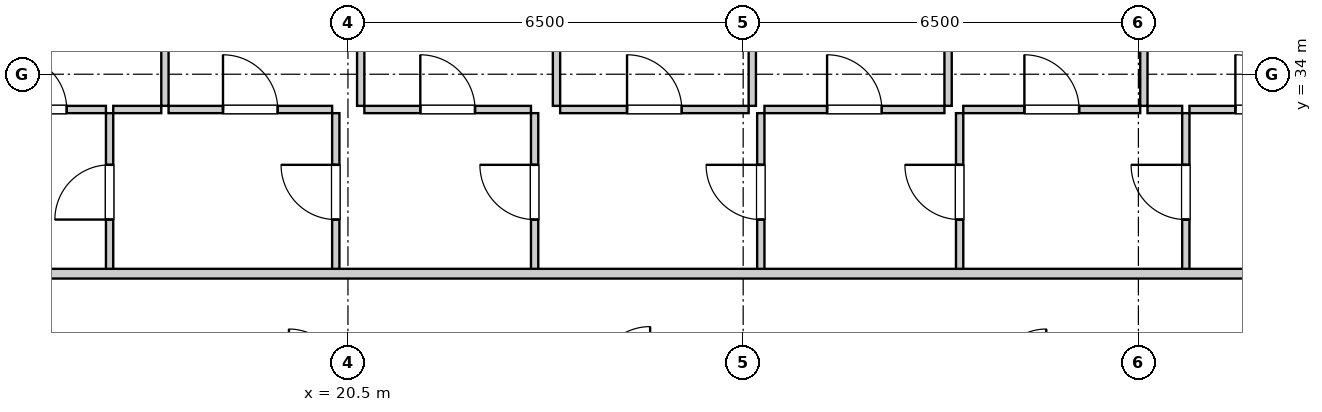
"""IFC4 building model, lengths in metres.
Left out: names, types, materials, properties, quantities, classifications, styles, units other than length and angle.
Written with IfcOpenShell. Run it as: python <this file> out.ifc"""

import sys

from ifc_helpers import new_model, si_unit, direction, frame, frame_2d, origin, place, context, subcontext, project, spatial, rectangle, extrude, element, fill, save


model = new_model("IFC4")
c1 = context("Model", 3, precision=1e-05, world=origin(), true_north=direction((0.0, 1.0)))
c2 = subcontext(c1, "Body", "Model", "MODEL_VIEW")
j1 = project(units=[si_unit("LENGTHUNIT", "METRE"), si_unit("PLANEANGLEUNIT", "RADIAN")], contexts=[c1])
p1 = place(None, origin())
s1 = spatial("IfcSite", under=j1, at=p1, CompositionType="ELEMENT")
p2 = place(p1, origin())
s2 = spatial("IfcBuilding", under=s1, at=p2, CompositionType="ELEMENT")
p3 = place(p2, frame((0.0, 0.0, 45.0)))
s3 = spatial("IfcBuildingStorey", under=s2, at=p3, CompositionType="ELEMENT", Elevation=45.0)
p4 = place(p3, frame((16.58, 30.76, 0.0), z_axis=(0.0, 0.0, 1.0), x_axis=(0.0, 1.0, 0.0)))
e1 = element("IfcWall", 1, at=p4, inside=s3, PredefinedType="PARTITIONING", context=c2, shape_type="SweptSolid", body=[
    extrude(rectangle(XDim=2.6, YDim=0.12, at=frame_2d((1.3, 0.0))), origin(), (0.0, 0.0, 1.0), 2.94),
])
p5 = place(p4, frame((0.85, 0.0, 0.0)))
e2 = element("IfcOpeningElement", 2, at=p5, cuts=e1, PredefinedType="OPENING", context=c2, shape_type="SweptSolid", body=[
    extrude(rectangle(XDim=0.9, YDim=2.05, at=frame_2d((0.45, 1.025))), frame((0.0, 0.07, 0.0), z_axis=(0.0, -1.0, 0.0), x_axis=(1.0, 0.0, 0.0)), (0.0, 0.0, 1.0), 0.14),
])
p6 = place(p3, frame((14.33, 33.42, 0.0), z_axis=(0.0, 0.0, 1.0), x_axis=(1.0, 0.0, 0.0)))
e3 = element("IfcWall", 3, at=p6, inside=s3, PredefinedType="PARTITIONING", context=c2, shape_type="SweptSolid", body=[
    extrude(rectangle(XDim=2.19, YDim=0.12, at=frame_2d((1.095, 0.0))), origin(), (0.0, 0.0, 1.0), 2.94),
])
p7 = place(p6, frame((0.645, 0.0, 0.0)))
e4 = element("IfcOpeningElement", 4, at=p7, cuts=e3, PredefinedType="OPENING", context=c2, shape_type="SweptSolid", body=[
    extrude(rectangle(XDim=0.9, YDim=2.05, at=frame_2d((0.45, 1.025))), frame((0.0, 0.07, 0.0), z_axis=(0.0, -1.0, 0.0), x_axis=(1.0, 0.0, 0.0)), (0.0, 0.0, 1.0), 0.14),
])
p8 = place(p3, frame((20.3, 30.76, 0.0), z_axis=(0.0, 0.0, 1.0), x_axis=(0.0, 1.0, 0.0)))
e5 = element("IfcWall", 5, at=p8, inside=s3, PredefinedType="PARTITIONING", context=c2, shape_type="SweptSolid", body=[
    extrude(rectangle(XDim=2.6, YDim=0.12, at=frame_2d((1.3, 0.0))), origin(), (0.0, 0.0, 1.0), 2.94),
])
p9 = place(p8, frame((0.85, 0.0, 0.0)))
e6 = element("IfcOpeningElement", 6, at=p9, cuts=e5, PredefinedType="OPENING", context=c2, shape_type="SweptSolid", body=[
    extrude(rectangle(XDim=0.9, YDim=2.05, at=frame_2d((0.45, 1.025))), frame((0.0, 0.07, 0.0), z_axis=(0.0, -1.0, 0.0), x_axis=(1.0, 0.0, 0.0)), (0.0, 0.0, 1.0), 0.14),
])
p10 = place(p3, frame((16.64, 33.42, 0.0), z_axis=(0.0, 0.0, 1.0), x_axis=(1.0, 0.0, 0.0)))
e7 = element("IfcWall", 7, at=p10, inside=s3, PredefinedType="PARTITIONING", context=c2, shape_type="SweptSolid", body=[
    extrude(rectangle(XDim=0.79, YDim=0.12, at=frame_2d((0.395, 0.0))), origin(), (0.0, 0.0, 1.0), 2.94),
])
p11 = place(p3, frame((17.55, 33.42, 0.0), z_axis=(0.0, 0.0, 1.0), x_axis=(1.0, 0.0, 0.0)))
e8 = element("IfcWall", 8, at=p11, inside=s3, PredefinedType="PARTITIONING", context=c2, shape_type="SweptSolid", body=[
    extrude(rectangle(XDim=2.69, YDim=0.12, at=frame_2d((1.345, 0.0))), origin(), (0.0, 0.0, 1.0), 2.94),
])
p12 = place(p11, frame((0.895, 0.0, 0.0)))
e9 = element("IfcOpeningElement", 9, at=p12, cuts=e8, PredefinedType="OPENING", context=c2, shape_type="SweptSolid", body=[
    extrude(rectangle(XDim=0.9, YDim=2.05, at=frame_2d((0.45, 1.025))), frame((0.0, 0.07, 0.0), z_axis=(0.0, -1.0, 0.0), x_axis=(1.0, 0.0, 0.0)), (0.0, 0.0, 1.0), 0.14),
])
p13 = place(p3, frame((23.57, 30.76, 0.0), z_axis=(0.0, 0.0, 1.0), x_axis=(0.0, 1.0, 0.0)))
e10 = element("IfcWall", 10, at=p13, inside=s3, PredefinedType="PARTITIONING", context=c2, shape_type="SweptSolid", body=[
    extrude(rectangle(XDim=2.6, YDim=0.12, at=frame_2d((1.3, 0.0))), origin(), (0.0, 0.0, 1.0), 2.94),
])
p14 = place(p13, frame((0.85, 0.0, 0.0)))
e11 = element("IfcOpeningElement", 11, at=p14, cuts=e10, PredefinedType="OPENING", context=c2, shape_type="SweptSolid", body=[
    extrude(rectangle(XDim=0.9, YDim=2.05, at=frame_2d((0.45, 1.025))), frame((0.0, 0.07, 0.0), z_axis=(0.0, -1.0, 0.0), x_axis=(1.0, 0.0, 0.0)), (0.0, 0.0, 1.0), 0.14),
])
p15 = place(p3, frame((20.77, 33.42, 0.0), z_axis=(0.0, 0.0, 1.0), x_axis=(1.0, 0.0, 0.0)))
e12 = element("IfcWall", 12, at=p15, inside=s3, PredefinedType="PARTITIONING", context=c2, shape_type="SweptSolid", body=[
    extrude(rectangle(XDim=2.74, YDim=0.12, at=frame_2d((1.37, 0.0))), origin(), (0.0, 0.0, 1.0), 2.94),
])
p16 = place(p15, frame((0.92, 0.0, 0.0)))
e13 = element("IfcOpeningElement", 13, at=p16, cuts=e12, PredefinedType="OPENING", context=c2, shape_type="SweptSolid", body=[
    extrude(rectangle(XDim=0.9, YDim=2.05, at=frame_2d((0.45, 1.025))), frame((0.0, 0.07, 0.0), z_axis=(0.0, -1.0, 0.0), x_axis=(1.0, 0.0, 0.0)), (0.0, 0.0, 1.0), 0.14),
])
p17 = place(p3, frame((27.29, 30.76, 0.0), z_axis=(0.0, 0.0, 1.0), x_axis=(0.0, 1.0, 0.0)))
e14 = element("IfcWall", 14, at=p17, inside=s3, PredefinedType="PARTITIONING", context=c2, shape_type="SweptSolid", body=[
    extrude(rectangle(XDim=2.6, YDim=0.12, at=frame_2d((1.3, 0.0))), origin(), (0.0, 0.0, 1.0), 2.94),
])
p18 = place(p17, frame((0.85, 0.0, 0.0)))
e15 = element("IfcOpeningElement", 15, at=p18, cuts=e14, PredefinedType="OPENING", context=c2, shape_type="SweptSolid", body=[
    extrude(rectangle(XDim=0.9, YDim=2.05, at=frame_2d((0.45, 1.025))), frame((0.0, 0.07, 0.0), z_axis=(0.0, -1.0, 0.0), x_axis=(1.0, 0.0, 0.0)), (0.0, 0.0, 1.0), 0.14),
])
p19 = place(p3, frame((23.99, 33.42, 0.0), z_axis=(0.0, 0.0, 1.0), x_axis=(1.0, 0.0, 0.0)))
e16 = element("IfcWall", 16, at=p19, inside=s3, PredefinedType="PARTITIONING", context=c2, shape_type="SweptSolid", body=[
    extrude(rectangle(XDim=3.1, YDim=0.12, at=frame_2d((1.55, 0.0))), origin(), (0.0, 0.0, 1.0), 2.94),
])
p20 = place(p19, frame((1.1, 0.0, 0.0)))
e17 = element("IfcOpeningElement", 17, at=p20, cuts=e16, PredefinedType="OPENING", context=c2, shape_type="SweptSolid", body=[
    extrude(rectangle(XDim=0.9, YDim=2.05, at=frame_2d((0.45, 1.025))), frame((0.0, 0.07, 0.0), z_axis=(0.0, -1.0, 0.0), x_axis=(1.0, 0.0, 0.0)), (0.0, 0.0, 1.0), 0.14),
])
p21 = place(p3, frame((30.56, 30.76, 0.0), z_axis=(0.0, 0.0, 1.0), x_axis=(0.0, 1.0, 0.0)))
e18 = element("IfcWall", 18, at=p21, inside=s3, PredefinedType="PARTITIONING", context=c2, shape_type="SweptSolid", body=[
    extrude(rectangle(XDim=2.6, YDim=0.12, at=frame_2d((1.3, 0.0))), origin(), (0.0, 0.0, 1.0), 2.94),
])
p22 = place(p21, frame((0.85, 0.0, 0.0)))
e19 = element("IfcOpeningElement", 19, at=p22, cuts=e18, PredefinedType="OPENING", context=c2, shape_type="SweptSolid", body=[
    extrude(rectangle(XDim=0.9, YDim=2.05, at=frame_2d((0.45, 1.025))), frame((0.0, 0.07, 0.0), z_axis=(0.0, -1.0, 0.0), x_axis=(1.0, 0.0, 0.0)), (0.0, 0.0, 1.0), 0.14),
])
p23 = place(p3, frame((27.35, 33.42, 0.0), z_axis=(0.0, 0.0, 1.0), x_axis=(1.0, 0.0, 0.0)))
e20 = element("IfcWall", 20, at=p23, inside=s3, PredefinedType="PARTITIONING", context=c2, shape_type="SweptSolid", body=[
    extrude(rectangle(XDim=2.96, YDim=0.12, at=frame_2d((1.48, 0.0))), origin(), (0.0, 0.0, 1.0), 2.94),
])
p24 = place(p23, frame((1.03, 0.0, 0.0)))
e21 = element("IfcOpeningElement", 21, at=p24, cuts=e20, PredefinedType="OPENING", context=c2, shape_type="SweptSolid", body=[
    extrude(rectangle(XDim=0.9, YDim=2.05, at=frame_2d((0.45, 1.025))), frame((0.0, 0.07, 0.0), z_axis=(0.0, -1.0, 0.0), x_axis=(1.0, 0.0, 0.0)), (0.0, 0.0, 1.0), 0.14),
])
p25 = place(p3, frame((34.28, 30.76, 0.0), z_axis=(0.0, 0.0, 1.0), x_axis=(0.0, 1.0, 0.0)))
e22 = element("IfcWall", 22, at=p25, inside=s3, PredefinedType="PARTITIONING", context=c2, shape_type="SweptSolid", body=[
    extrude(rectangle(XDim=2.6, YDim=0.12, at=frame_2d((1.3, 0.0))), origin(), (0.0, 0.0, 1.0), 2.94),
])
p26 = place(p25, frame((0.85, 0.0, 0.0)))
e23 = element("IfcOpeningElement", 23, at=p26, cuts=e22, PredefinedType="OPENING", context=c2, shape_type="SweptSolid", body=[
    extrude(rectangle(XDim=0.9, YDim=2.05, at=frame_2d((0.45, 1.025))), frame((0.0, 0.07, 0.0), z_axis=(0.0, -1.0, 0.0), x_axis=(1.0, 0.0, 0.0)), (0.0, 0.0, 1.0), 0.14),
])
p27 = place(p3, frame((30.62, 33.42, 0.0), z_axis=(0.0, 0.0, 1.0), x_axis=(1.0, 0.0, 0.0)))
e24 = element("IfcWall", 24, at=p27, inside=s3, PredefinedType="PARTITIONING", context=c2, shape_type="SweptSolid", body=[
    extrude(rectangle(XDim=2.91, YDim=0.12, at=frame_2d((1.455, 0.0))), origin(), (0.0, 0.0, 1.0), 2.94),
])
p28 = place(p27, frame((1.005, 0.0, 0.0)))
e25 = element("IfcOpeningElement", 25, at=p28, cuts=e24, PredefinedType="OPENING", context=c2, shape_type="SweptSolid", body=[
    extrude(rectangle(XDim=0.9, YDim=2.05, at=frame_2d((0.45, 1.025))), frame((0.0, 0.07, 0.0), z_axis=(0.0, -1.0, 0.0), x_axis=(1.0, 0.0, 0.0)), (0.0, 0.0, 1.0), 0.14),
])
p29 = place(p3, frame((33.65, 33.42, 0.0), z_axis=(0.0, 0.0, 1.0), x_axis=(1.0, 0.0, 0.0)))
e26 = element("IfcWall", 26, at=p29, inside=s3, PredefinedType="PARTITIONING", context=c2, shape_type="SweptSolid", body=[
    extrude(rectangle(XDim=0.57, YDim=0.12, at=frame_2d((0.285, 0.0))), origin(), (0.0, 0.0, 1.0), 2.94),
])
p30 = place(p3, frame((34.34, 33.42, 0.0), z_axis=(0.0, 0.0, 1.0), x_axis=(1.0, 0.0, 0.0)))
e27 = element("IfcWall", 27, at=p30, inside=s3, PredefinedType="PARTITIONING", context=c2, shape_type="SweptSolid", body=[
    extrude(rectangle(XDim=2.41, YDim=0.12, at=frame_2d((1.205, 0.0))), origin(), (0.0, 0.0, 1.0), 2.94),
])
p31 = place(p30, frame((0.755, 0.0, 0.0)))
e28 = element("IfcOpeningElement", 28, at=p31, cuts=e27, PredefinedType="OPENING", context=c2, shape_type="SweptSolid", body=[
    extrude(rectangle(XDim=0.9, YDim=2.05, at=frame_2d((0.45, 1.025))), frame((0.0, 0.07, 0.0), z_axis=(0.0, -1.0, 0.0), x_axis=(1.0, 0.0, 0.0)), (0.0, 0.0, 1.0), 0.14),
])
p32 = place(p3, frame((17.49, 33.48, 0.0), z_axis=(0.0, 0.0, 1.0), x_axis=(0.0, 1.0, 0.0)))
e29 = element("IfcWall", 29, at=p32, inside=s3, PredefinedType="PARTITIONING", context=c2, shape_type="SweptSolid", body=[
    extrude(rectangle(XDim=13.84, YDim=0.12, at=frame_2d((6.92, 0.0))), origin(), (0.0, 0.0, 1.0), 2.94),
])
p33 = place(p32, frame((6.455, 0.0, 0.0)))
e30 = element("IfcOpeningElement", 30, at=p33, cuts=e29, PredefinedType="OPENING", context=c2, shape_type="SweptSolid", body=[
    extrude(rectangle(XDim=0.9, YDim=2.05, at=frame_2d((0.45, 1.025))), frame((0.0, 0.07, 0.0), z_axis=(0.0, -1.0, 0.0), x_axis=(1.0, 0.0, 0.0)), (0.0, 0.0, 1.0), 0.14),
])
p34 = place(p3, frame((20.71, 33.48, 0.0), z_axis=(0.0, 0.0, 1.0), x_axis=(0.0, 1.0, 0.0)))
e31 = element("IfcWall", 31, at=p34, inside=s3, PredefinedType="PARTITIONING", context=c2, shape_type="SweptSolid", body=[
    extrude(rectangle(XDim=13.84, YDim=0.12, at=frame_2d((6.92, 0.0))), origin(), (0.0, 0.0, 1.0), 2.94),
])
p35 = place(p34, frame((6.455, 0.0, 0.0)))
e32 = element("IfcOpeningElement", 32, at=p35, cuts=e31, PredefinedType="OPENING", context=c2, shape_type="SweptSolid", body=[
    extrude(rectangle(XDim=0.9, YDim=2.05, at=frame_2d((0.45, 1.025))), frame((0.0, 0.07, 0.0), z_axis=(0.0, -1.0, 0.0), x_axis=(1.0, 0.0, 0.0)), (0.0, 0.0, 1.0), 0.14),
])
p36 = place(p3, frame((23.93, 33.48, 0.0), z_axis=(0.0, 0.0, 1.0), x_axis=(0.0, 1.0, 0.0)))
e33 = element("IfcWall", 33, at=p36, inside=s3, PredefinedType="PARTITIONING", context=c2, shape_type="SweptSolid", body=[
    extrude(rectangle(XDim=13.84, YDim=0.12, at=frame_2d((6.92, 0.0))), origin(), (0.0, 0.0, 1.0), 2.94),
])
p37 = place(p36, frame((6.455, 0.0, 0.0)))
e34 = element("IfcOpeningElement", 34, at=p37, cuts=e33, PredefinedType="OPENING", context=c2, shape_type="SweptSolid", body=[
    extrude(rectangle(XDim=0.9, YDim=2.05, at=frame_2d((0.45, 1.025))), frame((0.0, 0.07, 0.0), z_axis=(0.0, -1.0, 0.0), x_axis=(1.0, 0.0, 0.0)), (0.0, 0.0, 1.0), 0.14),
])
p38 = place(p3, frame((27.15, 33.48, 0.0), z_axis=(0.0, 0.0, 1.0), x_axis=(0.0, 1.0, 0.0)))
e35 = element("IfcWall", 35, at=p38, inside=s3, PredefinedType="PARTITIONING", context=c2, shape_type="SweptSolid", body=[
    extrude(rectangle(XDim=13.84, YDim=0.12, at=frame_2d((6.92, 0.0))), origin(), (0.0, 0.0, 1.0), 2.94),
])
p39 = place(p38, frame((6.455, 0.0, 0.0)))
e36 = element("IfcOpeningElement", 36, at=p39, cuts=e35, PredefinedType="OPENING", context=c2, shape_type="SweptSolid", body=[
    extrude(rectangle(XDim=0.9, YDim=2.05, at=frame_2d((0.45, 1.025))), frame((0.0, 0.07, 0.0), z_axis=(0.0, -1.0, 0.0), x_axis=(1.0, 0.0, 0.0)), (0.0, 0.0, 1.0), 0.14),
])
p40 = place(p3, frame((30.37, 33.48, 0.0), z_axis=(0.0, 0.0, 1.0), x_axis=(0.0, 1.0, 0.0)))
e37 = element("IfcWall", 37, at=p40, inside=s3, PredefinedType="PARTITIONING", context=c2, shape_type="SweptSolid", body=[
    extrude(rectangle(XDim=13.84, YDim=0.12, at=frame_2d((6.92, 0.0))), origin(), (0.0, 0.0, 1.0), 2.94),
])
p41 = place(p40, frame((6.455, 0.0, 0.0)))
e38 = element("IfcOpeningElement", 38, at=p41, cuts=e37, PredefinedType="OPENING", context=c2, shape_type="SweptSolid", body=[
    extrude(rectangle(XDim=0.9, YDim=2.05, at=frame_2d((0.45, 1.025))), frame((0.0, 0.07, 0.0), z_axis=(0.0, -1.0, 0.0), x_axis=(1.0, 0.0, 0.0)), (0.0, 0.0, 1.0), 0.14),
])
p42 = place(p3, frame((33.59, 33.48, 0.0), z_axis=(0.0, 0.0, 1.0), x_axis=(0.0, 1.0, 0.0)))
e39 = element("IfcWall", 39, at=p42, inside=s3, PredefinedType="PARTITIONING", context=c2, shape_type="SweptSolid", body=[
    extrude(rectangle(XDim=13.84, YDim=0.12, at=frame_2d((6.92, 0.0))), origin(), (0.0, 0.0, 1.0), 2.94),
])
p43 = place(p42, frame((6.455, 0.0, 0.0)))
e40 = element("IfcOpeningElement", 40, at=p43, cuts=e39, PredefinedType="OPENING", context=c2, shape_type="SweptSolid", body=[
    extrude(rectangle(XDim=0.9, YDim=2.05, at=frame_2d((0.45, 1.025))), frame((0.0, 0.07, 0.0), z_axis=(0.0, -1.0, 0.0), x_axis=(1.0, 0.0, 0.0)), (0.0, 0.0, 1.0), 0.14),
])
p44 = place(p3, frame((10.05, 30.72, 0.0), z_axis=(0.0, 0.0, 1.0), x_axis=(1.0, 0.0, 0.0)))
e41 = element("IfcWall", 41, at=p44, inside=s3, PredefinedType="PARTITIONING", context=c2, shape_type="SweptSolid", body=[
    extrude(rectangle(XDim=33.9, YDim=0.16, at=frame_2d((16.95, 0.0))), origin(), (0.0, 0.0, 1.0), 2.94),
])
p45 = place(p44, frame((4.035, 0.0, 0.0)))
e42 = element("IfcOpeningElement", 42, at=p45, cuts=e41, PredefinedType="OPENING", context=c2, shape_type="SweptSolid", body=[
    extrude(rectangle(XDim=0.95, YDim=2.1, at=frame_2d((0.475, 1.05))), frame((0.0, 0.09, 0.0), z_axis=(0.0, -1.0, 0.0), x_axis=(1.0, 0.0, 0.0)), (0.0, 0.0, 1.0), 0.18),
])
p46 = place(p5, origin())
e43 = element("IfcDoor", 43, at=p46, inside=s3, OperationType="SINGLE_SWING_LEFT", PredefinedType="DOOR", context=c2, shape_type="SweptSolid", body=[
    extrude(rectangle(XDim=0.9, YDim=2.05, at=frame_2d((0.45, 1.025))), frame((0.0, 0.025, 0.0), z_axis=(0.0, -1.0, 0.0), x_axis=(1.0, 0.0, 0.0)), (0.0, 0.0, 1.0), 0.05),
])
fill(e2, e43)
p47 = place(p7, origin())
e44 = element("IfcDoor", 44, at=p47, inside=s3, OperationType="SINGLE_SWING_LEFT", PredefinedType="DOOR", context=c2, shape_type="SweptSolid", body=[
    extrude(rectangle(XDim=0.9, YDim=2.05, at=frame_2d((0.45, 1.025))), frame((0.0, 0.025, 0.0), z_axis=(0.0, -1.0, 0.0), x_axis=(1.0, 0.0, 0.0)), (0.0, 0.0, 1.0), 0.05),
])
fill(e4, e44)
p48 = place(p9, origin())
e45 = element("IfcDoor", 45, at=p48, inside=s3, OperationType="SINGLE_SWING_RIGHT", PredefinedType="DOOR", context=c2, shape_type="SweptSolid", body=[
    extrude(rectangle(XDim=0.9, YDim=2.05, at=frame_2d((0.45, 1.025))), frame((0.0, 0.025, 0.0), z_axis=(0.0, -1.0, 0.0), x_axis=(1.0, 0.0, 0.0)), (0.0, 0.0, 1.0), 0.05),
])
fill(e6, e45)
p49 = place(p12, origin())
e46 = element("IfcDoor", 46, at=p49, inside=s3, OperationType="SINGLE_SWING_LEFT", PredefinedType="DOOR", context=c2, shape_type="SweptSolid", body=[
    extrude(rectangle(XDim=0.9, YDim=2.05, at=frame_2d((0.45, 1.025))), frame((0.0, 0.025, 0.0), z_axis=(0.0, -1.0, 0.0), x_axis=(1.0, 0.0, 0.0)), (0.0, 0.0, 1.0), 0.05),
])
fill(e9, e46)
p50 = place(p14, origin())
e47 = element("IfcDoor", 47, at=p50, inside=s3, OperationType="SINGLE_SWING_RIGHT", PredefinedType="DOOR", context=c2, shape_type="SweptSolid", body=[
    extrude(rectangle(XDim=0.9, YDim=2.05, at=frame_2d((0.45, 1.025))), frame((0.0, 0.025, 0.0), z_axis=(0.0, -1.0, 0.0), x_axis=(1.0, 0.0, 0.0)), (0.0, 0.0, 1.0), 0.05),
])
fill(e11, e47)
p51 = place(p16, origin())
e48 = element("IfcDoor", 48, at=p51, inside=s3, OperationType="SINGLE_SWING_LEFT", PredefinedType="DOOR", context=c2, shape_type="SweptSolid", body=[
    extrude(rectangle(XDim=0.9, YDim=2.05, at=frame_2d((0.45, 1.025))), frame((0.0, 0.025, 0.0), z_axis=(0.0, -1.0, 0.0), x_axis=(1.0, 0.0, 0.0)), (0.0, 0.0, 1.0), 0.05),
])
fill(e13, e48)
p52 = place(p18, origin())
e49 = element("IfcDoor", 49, at=p52, inside=s3, OperationType="SINGLE_SWING_RIGHT", PredefinedType="DOOR", context=c2, shape_type="SweptSolid", body=[
    extrude(rectangle(XDim=0.9, YDim=2.05, at=frame_2d((0.45, 1.025))), frame((0.0, 0.025, 0.0), z_axis=(0.0, -1.0, 0.0), x_axis=(1.0, 0.0, 0.0)), (0.0, 0.0, 1.0), 0.05),
])
fill(e15, e49)
p53 = place(p20, origin())
e50 = element("IfcDoor", 50, at=p53, inside=s3, OperationType="SINGLE_SWING_LEFT", PredefinedType="DOOR", context=c2, shape_type="SweptSolid", body=[
    extrude(rectangle(XDim=0.9, YDim=2.05, at=frame_2d((0.45, 1.025))), frame((0.0, 0.025, 0.0), z_axis=(0.0, -1.0, 0.0), x_axis=(1.0, 0.0, 0.0)), (0.0, 0.0, 1.0), 0.05),
])
fill(e17, e50)
p54 = place(p22, origin())
e51 = element("IfcDoor", 51, at=p54, inside=s3, OperationType="SINGLE_SWING_RIGHT", PredefinedType="DOOR", context=c2, shape_type="SweptSolid", body=[
    extrude(rectangle(XDim=0.9, YDim=2.05, at=frame_2d((0.45, 1.025))), frame((0.0, 0.025, 0.0), z_axis=(0.0, -1.0, 0.0), x_axis=(1.0, 0.0, 0.0)), (0.0, 0.0, 1.0), 0.05),
])
fill(e19, e51)
p55 = place(p24, origin())
e52 = element("IfcDoor", 52, at=p55, inside=s3, OperationType="SINGLE_SWING_LEFT", PredefinedType="DOOR", context=c2, shape_type="SweptSolid", body=[
    extrude(rectangle(XDim=0.9, YDim=2.05, at=frame_2d((0.45, 1.025))), frame((0.0, 0.025, 0.0), z_axis=(0.0, -1.0, 0.0), x_axis=(1.0, 0.0, 0.0)), (0.0, 0.0, 1.0), 0.05),
])
fill(e21, e52)
p56 = place(p26, origin())
e53 = element("IfcDoor", 53, at=p56, inside=s3, OperationType="SINGLE_SWING_RIGHT", PredefinedType="DOOR", context=c2, shape_type="SweptSolid", body=[
    extrude(rectangle(XDim=0.9, YDim=2.05, at=frame_2d((0.45, 1.025))), frame((0.0, 0.025, 0.0), z_axis=(0.0, -1.0, 0.0), x_axis=(1.0, 0.0, 0.0)), (0.0, 0.0, 1.0), 0.05),
])
fill(e23, e53)
p57 = place(p28, origin())
e54 = element("IfcDoor", 54, at=p57, inside=s3, OperationType="SINGLE_SWING_LEFT", PredefinedType="DOOR", context=c2, shape_type="SweptSolid", body=[
    extrude(rectangle(XDim=0.9, YDim=2.05, at=frame_2d((0.45, 1.025))), frame((0.0, 0.025, 0.0), z_axis=(0.0, -1.0, 0.0), x_axis=(1.0, 0.0, 0.0)), (0.0, 0.0, 1.0), 0.05),
])
fill(e25, e54)
p58 = place(p31, origin())
e55 = element("IfcDoor", 55, at=p58, inside=s3, OperationType="SINGLE_SWING_LEFT", PredefinedType="DOOR", context=c2, shape_type="SweptSolid", body=[
    extrude(rectangle(XDim=0.9, YDim=2.05, at=frame_2d((0.45, 1.025))), frame((0.0, 0.025, 0.0), z_axis=(0.0, -1.0, 0.0), x_axis=(1.0, 0.0, 0.0)), (0.0, 0.0, 1.0), 0.05),
])
fill(e28, e55)
save(model, sys.argv[1])
